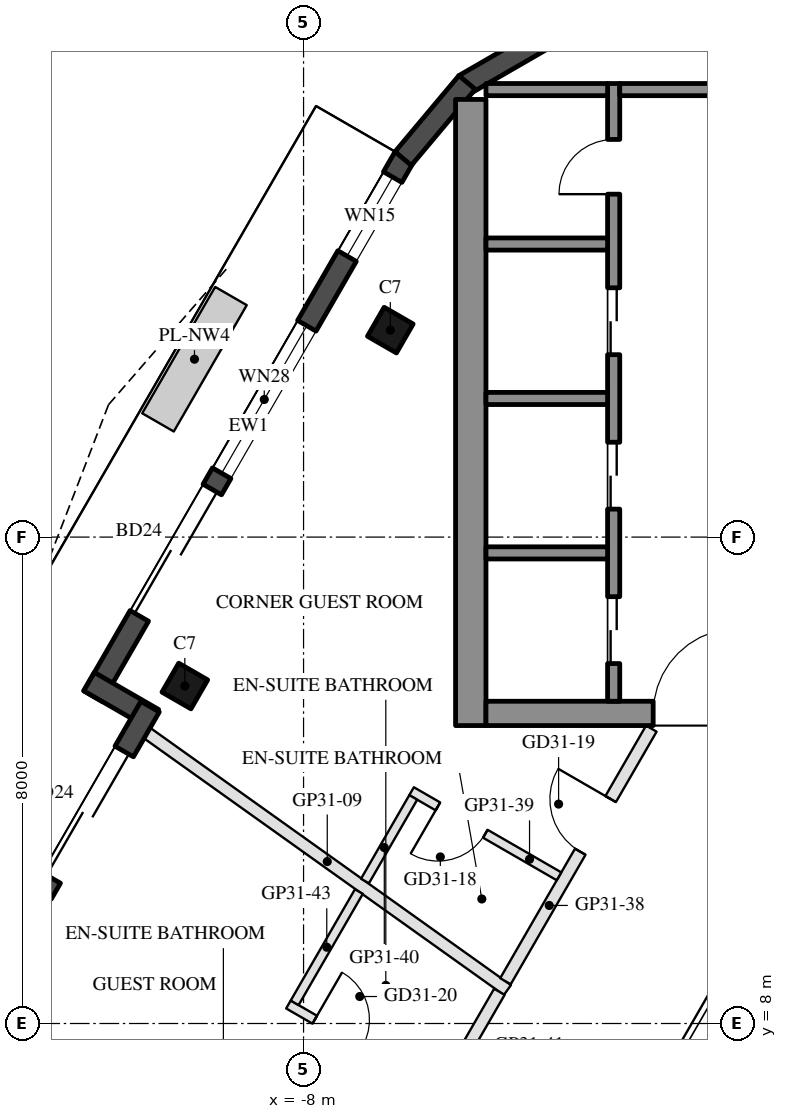
"""IFC4 building model, lengths in metres.
Left out: names, types, materials, properties, quantities, classifications, styles, units other than length and angle.
Written with IfcOpenShell. Run it as: python <this file> out.ifc"""

import sys

from ifc_helpers import new_model, si_unit, direction, frame, frame_2d, origin, origin_2d, place, context, subcontext, project, spatial, rectangle, hollow_rectangle, extrude, boolean, halfspace, element, fill, save


model = new_model("IFC4")
c1 = context("Model", 3, precision=1e-05, world=origin(), true_north=direction((0.0, 1.0)))
c2 = subcontext(c1, "Body", "Model", "MODEL_VIEW")
j1 = project(units=[si_unit("LENGTHUNIT", "METRE"), si_unit("PLANEANGLEUNIT", "RADIAN")], contexts=[c1])
p1 = place(None, origin())
s1 = spatial("IfcSite", under=j1, at=p1, CompositionType="ELEMENT")
p2 = place(p1, origin())
s2 = spatial("IfcBuilding", under=s1, at=p2, CompositionType="ELEMENT")
p3 = place(p2, frame((0.0, 0.0, 305.9)))
s3 = spatial("IfcBuildingStorey", under=s2, at=p3, CompositionType="ELEMENT", Elevation=305.9)
p4 = place(p3, frame((-6.573, 19.404, 0.0), z_axis=(0.0, 0.0, 1.0), x_axis=(0.5, 0.866025403784, 0.0)))
e1 = element("IfcColumn", 1, at=p4, inside=s3, PredefinedType="COLUMN", context=c2, shape_type="SweptSolid", body=[
    boolean("DIFFERENCE", extrude(hollow_rectangle(XDim=0.55, YDim=0.55, WallThickness=0.025, at=origin_2d()), origin(), (0.0, 0.0, 1.0), 3.7), halfspace(frame((0.0, 0.0, 3.66), z_axis=(0.0, 0.0, 1.0), x_axis=(1.0, 0.0, 0.0)), False)),
])
p5 = place(p3, frame((-9.953, 13.551, 0.0), z_axis=(0.0, 0.0, 1.0), x_axis=(0.5, 0.866025403784, 0.0)))
e2 = element("IfcColumn", 2, at=p5, inside=s3, PredefinedType="COLUMN", context=c2, shape_type="SweptSolid", body=[
    boolean("DIFFERENCE", extrude(hollow_rectangle(XDim=0.55, YDim=0.55, WallThickness=0.025, at=origin_2d()), origin(), (0.0, 0.0, 1.0), 3.7), halfspace(frame((0.0, 0.0, 3.666), z_axis=(0.0, 0.0, 1.0), x_axis=(1.0, 0.0, 0.0)), False)),
])
p6 = place(p3, frame((-6.344, 22.251, 0.0), z_axis=(0.0, 0.0, 1.0), x_axis=(-0.499983205548, -0.866035099848, 0.0)))
e3 = element("IfcWall", 3, at=p6, inside=s3, PredefinedType="SOLIDWALL", context=c2, shape_type="SweptSolid", body=[
    extrude(rectangle(XDim=10.239, YDim=0.35, at=frame_2d((5.12, 0.0))), origin(), (0.0, 0.0, 1.0), 3.55),
])
p7 = place(p6, frame((0.381, 0.0, 0.3)))
e4 = element("IfcOpeningElement", 4, at=p7, cuts=e3, PredefinedType="OPENING", context=c2, shape_type="SweptSolid", body=[
    extrude(rectangle(XDim=1.5, YDim=2.65, at=frame_2d((0.75, 1.325))), frame((0.0, 0.185, 0.0), z_axis=(0.0, -1.0, 0.0), x_axis=(1.0, 0.0, 0.0)), (0.0, 0.0, 1.0), 0.37),
])
p8 = place(p6, frame((6.314, 0.0, 0.0)))
e5 = element("IfcOpeningElement", 5, at=p8, cuts=e3, PredefinedType="OPENING", context=c2, shape_type="SweptSolid", body=[
    extrude(rectangle(XDim=2.4, YDim=2.4, at=frame_2d((1.2, 1.2))), frame((0.0, 0.185, 0.0), z_axis=(0.0, -1.0, 0.0), x_axis=(1.0, 0.0, 0.0)), (0.0, 0.0, 1.0), 0.37),
])
p9 = place(p6, frame((3.205, 0.0, 0.3)))
e6 = element("IfcOpeningElement", 6, at=p9, cuts=e3, PredefinedType="OPENING", context=c2, shape_type="SweptSolid", body=[
    extrude(rectangle(XDim=2.8, YDim=2.65, at=frame_2d((1.4, 1.325))), frame((0.0, 0.185, 0.0), z_axis=(0.0, -1.0, 0.0), x_axis=(1.0, 0.0, 0.0)), (0.0, 0.0, 1.0), 0.37),
])
p10 = place(p3, frame((-11.528, 13.623, 0.0), z_axis=(0.0, 0.0, 1.0), x_axis=(0.866005645448, -0.500034220881, 0.0)))
e7 = element("IfcWall", 7, at=p10, inside=s3, PredefinedType="SOLIDWALL", context=c2, shape_type="SweptSolid", body=[
    extrude(rectangle(XDim=1.22, YDim=0.35, at=frame_2d((0.61, 0.0))), origin(), (0.0, 0.0, 1.0), 3.55),
])
p11 = place(p3, frame((-10.524, 13.211, 0.0), z_axis=(0.0, 0.0, 1.0), x_axis=(-0.500008054862, -0.866020753258, 0.0)))
e8 = element("IfcWall", 8, at=p11, inside=s3, PredefinedType="SOLIDWALL", context=c2, shape_type="SweptSolid", body=[
    extrude(rectangle(XDim=5.599, YDim=0.35, at=frame_2d((2.8, 0.0))), origin(), (0.0, 0.0, 1.0), 3.55),
])
p12 = place(p11, frame((0.851, 0.0, 0.0)))
e9 = element("IfcOpeningElement", 9, at=p12, cuts=e8, PredefinedType="OPENING", context=c2, shape_type="SweptSolid", body=[
    extrude(rectangle(XDim=2.4, YDim=2.4, at=frame_2d((1.2, 1.2))), frame((0.0, 0.185, 0.0), z_axis=(0.0, -1.0, 0.0), x_axis=(1.0, 0.0, 0.0)), (0.0, 0.0, 1.0), 0.37),
])
p13 = place(p11, frame((3.551, 0.0, 0.3)))
e10 = element("IfcOpeningElement", 10, at=p13, cuts=e8, PredefinedType="OPENING", context=c2, shape_type="SweptSolid", body=[
    extrude(rectangle(XDim=1.7, YDim=2.65, at=frame_2d((0.85, 1.325))), frame((0.0, 0.185, 0.0), z_axis=(0.0, -1.0, 0.0), x_axis=(1.0, 0.0, 0.0)), (0.0, 0.0, 1.0), 0.37),
])
p14 = place(p3, frame((-3.942, 24.256, 0.0), z_axis=(0.0, 0.0, 1.0), x_axis=(-0.866018903231, -0.500011259119, 0.0)))
e11 = element("IfcWall", 11, at=p14, inside=s3, PredefinedType="SOLIDWALL", context=c2, shape_type="SweptSolid", body=[
    extrude(rectangle(XDim=1.634, YDim=0.35, at=frame_2d((0.817, 0.0))), origin(), (0.0, 0.0, 1.0), 3.55),
])
p15 = place(p3, frame((-5.311, 23.478, 0.0), z_axis=(0.0, 0.0, 1.0), x_axis=(-0.642782014883, -0.766049137682, 0.0)))
e12 = element("IfcWall", 12, at=p15, inside=s3, PredefinedType="SOLIDWALL", context=c2, shape_type="SweptSolid", body=[
    extrude(rectangle(XDim=1.634, YDim=0.35, at=frame_2d((0.817, 0.0))), origin(), (0.0, 0.0, 1.0), 3.55),
])
p16 = place(p3, frame((-5.25, 12.9, 0.0), z_axis=(0.0, 0.0, 1.0), x_axis=(0.0, 1.0, 0.0)))
e13 = element("IfcWall", 13, at=p16, inside=s3, PredefinedType="SHEAR", context=c2, shape_type="SweptSolid", body=[
    extrude(rectangle(XDim=10.299, YDim=0.5, at=frame_2d((5.149, 0.0))), origin(), (0.0, 0.0, 1.0), 3.5),
])
p17 = place(p3, frame((5.0, 13.1, 0.0), z_axis=(0.0, 0.0, 1.0), x_axis=(-1.0, 0.0, 0.0)))
e14 = element("IfcWall", 14, at=p17, inside=s3, PredefinedType="SHEAR", context=c2, shape_type="SweptSolid", body=[
    extrude(rectangle(XDim=10.0, YDim=0.4, at=frame_2d((5.0, 0.0))), origin(), (0.0, 0.0, 1.0), 3.5),
])
p18 = place(p17, frame((3.55, 0.0, 0.0)))
e15 = element("IfcOpeningElement", 15, at=p18, cuts=e14, PredefinedType="OPENING", context=c2, shape_type="SweptSolid", body=[
    extrude(rectangle(XDim=1.1, YDim=2.1, at=frame_2d((0.55, 1.05))), frame((0.0, 0.21, 0.0), z_axis=(0.0, -1.0, 0.0), x_axis=(1.0, 0.0, 0.0)), (0.0, 0.0, 1.0), 0.42),
])
p19 = place(p17, frame((5.85, 0.0, 0.0)))
e16 = element("IfcOpeningElement", 16, at=p19, cuts=e14, PredefinedType="OPENING", context=c2, shape_type="SweptSolid", body=[
    extrude(rectangle(XDim=1.4, YDim=2.1, at=frame_2d((0.7, 1.05))), frame((0.0, 0.21, 0.0), z_axis=(0.0, -1.0, 0.0), x_axis=(1.0, 0.0, 0.0)), (0.0, 0.0, 1.0), 0.42),
])
p20 = place(p3, frame((-2.9, 13.3, 0.0), z_axis=(0.0, 0.0, 1.0), x_axis=(0.0, 1.0, 0.0)))
e17 = element("IfcWall", 17, at=p20, inside=s3, PredefinedType="SHEAR", context=c2, shape_type="SweptSolid", body=[
    extrude(rectangle(XDim=10.16, YDim=0.2, at=frame_2d((5.08, 0.0))), origin(), (0.0, 0.0, 1.0), 3.5),
])
p21 = place(p20, frame((0.62, 0.0, 0.0)))
e18 = element("IfcOpeningElement", 18, at=p21, cuts=e17, PredefinedType="OPENING", context=c2, shape_type="SweptSolid", body=[
    extrude(rectangle(XDim=1.1, YDim=2.1, at=frame_2d((0.55, 1.05))), frame((0.0, 0.11, 0.0), z_axis=(0.0, -1.0, 0.0), x_axis=(1.0, 0.0, 0.0)), (0.0, 0.0, 1.0), 0.22),
])
p22 = place(p20, frame((3.16, 0.0, 0.0)))
e19 = element("IfcOpeningElement", 19, at=p22, cuts=e17, PredefinedType="OPENING", context=c2, shape_type="SweptSolid", body=[
    extrude(rectangle(XDim=1.1, YDim=2.1, at=frame_2d((0.55, 1.05))), frame((0.0, 0.11, 0.0), z_axis=(0.0, -1.0, 0.0), x_axis=(1.0, 0.0, 0.0)), (0.0, 0.0, 1.0), 0.22),
])
p23 = place(p20, frame((5.7, 0.0, 0.0)))
e20 = element("IfcOpeningElement", 20, at=p23, cuts=e17, PredefinedType="OPENING", context=c2, shape_type="SweptSolid", body=[
    extrude(rectangle(XDim=1.1, YDim=2.1, at=frame_2d((0.55, 1.05))), frame((0.0, 0.11, 0.0), z_axis=(0.0, -1.0, 0.0), x_axis=(1.0, 0.0, 0.0)), (0.0, 0.0, 1.0), 0.22),
])
p24 = place(p20, frame((8.34, 0.0, 0.0)))
e21 = element("IfcOpeningElement", 21, at=p24, cuts=e17, PredefinedType="OPENING", context=c2, shape_type="SweptSolid", body=[
    extrude(rectangle(XDim=0.9, YDim=2.1, at=frame_2d((0.45, 1.05))), frame((0.0, 0.11, 0.0), z_axis=(0.0, -1.0, 0.0), x_axis=(1.0, 0.0, 0.0)), (0.0, 0.0, 1.0), 0.22),
])
p25 = place(p3, frame((-1.0, 23.36, 0.0), z_axis=(0.0, 0.0, 1.0), x_axis=(-1.0, 0.0, 0.0)))
e22 = element("IfcWall", 22, at=p25, inside=s3, PredefinedType="SHEAR", context=c2, shape_type="SweptSolid", body=[
    extrude(rectangle(XDim=1.8, YDim=0.2, at=frame_2d((0.9, 0.0))), origin(), (0.0, 0.0, 1.0), 3.5),
])
for number, where, z_axis, x_axis in (
    (23, (-3.0, 15.74, 0.0), (0.0, 0.0, 1.0), (-1.0, 0.0, 0.0)),
    (24, (-3.0, 18.28, 0.0), (0.0, 0.0, 1.0), (-1.0, 0.0, 0.0)),
    (25, (-3.0, 20.82, 0.0), (0.0, 0.0, 1.0), (-1.0, 0.0, 0.0)),
    (26, (-3.0, 23.36, 0.0), (0.0, 0.0, 1.0), (-1.0, 0.0, 0.0)),
):
    element("IfcWall", number, at=place(p3, frame(where, z_axis=z_axis, x_axis=x_axis)), inside=s3, PredefinedType="SHEAR", context=c2, shape_type="SweptSolid", body=[
        extrude(rectangle(XDim=2.0, YDim=0.2, at=frame_2d((1.0, 0.0))), origin(), (0.0, 0.0, 1.0), 3.5),
    ])
p26 = place(p3, frame((-10.573, 12.776, 0.0), z_axis=(0.0, 0.0, 1.0), x_axis=(0.814114082564, -0.580704968613, 0.0)))
e27 = element("IfcWall", 27, at=p26, inside=s3, PredefinedType="PARTITIONING", context=c2, shape_type="SweptSolid", body=[
    extrude(rectangle(XDim=7.278, YDim=0.2, at=frame_2d((3.639, 0.0))), origin(), (0.0, 0.0, 1.0), 3.1),
])
p27 = place(p3, frame((-4.679, 8.695, 0.0), z_axis=(0.0, 0.0, 1.0), x_axis=(0.499986760557, 0.866033047446, 0.0)))
e28 = element("IfcWall", 28, at=p27, inside=s3, PredefinedType="PARTITIONING", context=c2, shape_type="SweptSolid", body=[
    extrude(rectangle(XDim=4.798, YDim=0.2, at=frame_2d((2.399, 0.0))), origin(), (0.0, 0.0, 1.0), 3.1),
])
p28 = place(p27, frame((2.46, 0.0, 0.0)))
e29 = element("IfcOpeningElement", 29, at=p28, cuts=e28, PredefinedType="OPENING", context=c2, shape_type="SweptSolid", body=[
    extrude(rectangle(XDim=1.0, YDim=2.1, at=frame_2d((0.5, 1.05))), frame((0.0, 0.11, 0.0), z_axis=(0.0, -1.0, 0.0), x_axis=(1.0, 0.0, 0.0)), (0.0, 0.0, 1.0), 0.22),
])
p29 = place(p3, frame((-3.799, 10.421, 0.0), z_axis=(0.0, 0.0, 1.0), x_axis=(-0.866034573852, 0.49998411664, 0.0)))
e30 = element("IfcWall", 30, at=p29, inside=s3, PredefinedType="PARTITIONING", context=c2, shape_type="SweptSolid", body=[
    extrude(rectangle(XDim=2.8, YDim=0.15, at=frame_2d((1.4, 0.0))), origin(), (0.0, 0.0, 1.0), 3.55),
])
p30 = place(p29, frame((1.4, 0.0, 0.0)))
e31 = element("IfcOpeningElement", 31, at=p30, cuts=e30, PredefinedType="OPENING", context=c2, shape_type="SweptSolid", body=[
    extrude(rectangle(XDim=0.9, YDim=2.1, at=frame_2d((0.45, 1.05))), frame((0.0, 0.085, 0.0), z_axis=(0.0, -1.0, 0.0), x_axis=(1.0, 0.0, 0.0)), (0.0, 0.0, 1.0), 0.17),
])
p31 = place(p3, frame((-6.196, 11.719, 0.0), z_axis=(0.0, 0.0, 1.0), x_axis=(-0.500041894521, -0.86600121462, 0.0)))
e32 = element("IfcWall", 32, at=p31, inside=s3, PredefinedType="PARTITIONING", context=c2, shape_type="SweptSolid", body=[
    extrude(rectangle(XDim=1.588, YDim=0.15, at=frame_2d((0.794, 0.0))), origin(), (0.0, 0.0, 1.0), 3.1),
])
p32 = place(p3, frame((-7.326, 4.111, 0.0), z_axis=(0.0, 0.0, 1.0), x_axis=(0.499970062876, 0.866042687301, 0.0)))
e33 = element("IfcWall", 33, at=p32, inside=s3, PredefinedType="PARTITIONING", context=c2, shape_type="SweptSolid", body=[
    extrude(rectangle(XDim=5.093, YDim=0.2, at=frame_2d((2.546, 0.0))), origin(), (0.0, 0.0, 1.0), 3.1),
])
p33 = place(p32, frame((1.652, 0.0, 0.0)))
e34 = element("IfcOpeningElement", 34, at=p33, cuts=e33, PredefinedType="OPENING", context=c2, shape_type="SweptSolid", body=[
    extrude(rectangle(XDim=1.0, YDim=2.1, at=frame_2d((0.5, 1.05))), frame((0.0, 0.11, 0.0), z_axis=(0.0, -1.0, 0.0), x_axis=(1.0, 0.0, 0.0)), (0.0, 0.0, 1.0), 0.22),
])
p34 = place(p3, frame((-8.249, 8.312, 0.0), z_axis=(0.0, 0.0, 1.0), x_axis=(0.866034573852, -0.49998411664, 0.0)))
e35 = element("IfcWall", 35, at=p34, inside=s3, PredefinedType="PARTITIONING", context=c2, shape_type="SweptSolid", body=[
    extrude(rectangle(XDim=2.8, YDim=0.15, at=frame_2d((1.4, 0.0))), origin(), (0.0, 0.0, 1.0), 3.55),
])
p35 = place(p34, frame((0.5, 0.0, 0.0)))
e36 = element("IfcOpeningElement", 36, at=p35, cuts=e35, PredefinedType="OPENING", context=c2, shape_type="SweptSolid", body=[
    extrude(rectangle(XDim=0.9, YDim=2.1, at=frame_2d((0.45, 1.05))), frame((0.0, 0.085, 0.0), z_axis=(0.0, -1.0, 0.0), x_axis=(1.0, 0.0, 0.0)), (0.0, 0.0, 1.0), 0.17),
])
p36 = place(p3, frame((-7.09, 10.169, 0.0), z_axis=(0.0, 0.0, 1.0), x_axis=(-0.500079259916, -0.865979638214, 0.0)))
e37 = element("IfcWall", 37, at=p36, inside=s3, PredefinedType="PARTITIONING", context=c2, shape_type="SweptSolid", body=[
    extrude(rectangle(XDim=2.113, YDim=0.15, at=frame_2d((1.056, 0.0))), origin(), (0.0, 0.0, 1.0), 3.1),
])
p37 = place(p7, origin())
e38 = element("IfcWindow", 38, at=p37, inside=s3, PartitioningType="SINGLE_PANEL", PredefinedType="WINDOW", context=c2, shape_type="SweptSolid", body=[
    extrude(rectangle(XDim=1.5, YDim=2.65, at=frame_2d((0.75, 1.325))), frame((0.0, 0.03, 0.0), z_axis=(0.0, -1.0, 0.0), x_axis=(1.0, 0.0, 0.0)), (0.0, 0.0, 1.0), 0.06),
])
fill(e4, e38)
p38 = place(p8, frame((2.4, 0.0, 0.0), z_axis=(0.0, 0.0, 1.0), x_axis=(-1.0, 0.0, 0.0)))
e39 = element("IfcDoor", 39, at=p38, inside=s3, OperationType="SLIDING_TO_LEFT", PredefinedType="DOOR", context=c2, shape_type="SweptSolid", body=[
    extrude(rectangle(XDim=2.4, YDim=2.4, at=frame_2d((1.2, 1.2))), frame((0.0, 0.025, 0.0), z_axis=(0.0, -1.0, 0.0), x_axis=(1.0, 0.0, 0.0)), (0.0, 0.0, 1.0), 0.05),
])
fill(e5, e39)
p39 = place(p9, origin())
e40 = element("IfcWindow", 40, at=p39, inside=s3, PartitioningType="SINGLE_PANEL", PredefinedType="WINDOW", context=c2, shape_type="SweptSolid", body=[
    extrude(rectangle(XDim=2.8, YDim=2.65, at=frame_2d((1.4, 1.325))), frame((0.0, 0.03, 0.0), z_axis=(0.0, -1.0, 0.0), x_axis=(1.0, 0.0, 0.0)), (0.0, 0.0, 1.0), 0.06),
])
fill(e6, e40)
p40 = place(p12, frame((2.4, 0.0, 0.0), z_axis=(0.0, 0.0, 1.0), x_axis=(-1.0, 0.0, 0.0)))
e41 = element("IfcDoor", 41, at=p40, inside=s3, OperationType="SLIDING_TO_LEFT", PredefinedType="DOOR", context=c2, shape_type="SweptSolid", body=[
    extrude(rectangle(XDim=2.4, YDim=2.4, at=frame_2d((1.2, 1.2))), frame((0.0, 0.025, 0.0), z_axis=(0.0, -1.0, 0.0), x_axis=(1.0, 0.0, 0.0)), (0.0, 0.0, 1.0), 0.05),
])
fill(e9, e41)
p41 = place(p21, origin())
e42 = element("IfcDoor", 42, at=p41, inside=s3, OperationType="DOUBLE_DOOR_SLIDING", PredefinedType="DOOR", context=c2, shape_type="SweptSolid", body=[
    extrude(rectangle(XDim=1.1, YDim=2.1, at=frame_2d((0.55, 1.05))), frame((0.0, 0.025, 0.0), z_axis=(0.0, -1.0, 0.0), x_axis=(1.0, 0.0, 0.0)), (0.0, 0.0, 1.0), 0.05),
])
fill(e18, e42)
p42 = place(p22, origin())
e43 = element("IfcDoor", 43, at=p42, inside=s3, OperationType="DOUBLE_DOOR_SLIDING", PredefinedType="DOOR", context=c2, shape_type="SweptSolid", body=[
    extrude(rectangle(XDim=1.1, YDim=2.1, at=frame_2d((0.55, 1.05))), frame((0.0, 0.025, 0.0), z_axis=(0.0, -1.0, 0.0), x_axis=(1.0, 0.0, 0.0)), (0.0, 0.0, 1.0), 0.05),
])
fill(e19, e43)
p43 = place(p23, origin())
e44 = element("IfcDoor", 44, at=p43, inside=s3, OperationType="DOUBLE_DOOR_SLIDING", PredefinedType="DOOR", context=c2, shape_type="SweptSolid", body=[
    extrude(rectangle(XDim=1.1, YDim=2.1, at=frame_2d((0.55, 1.05))), frame((0.0, 0.025, 0.0), z_axis=(0.0, -1.0, 0.0), x_axis=(1.0, 0.0, 0.0)), (0.0, 0.0, 1.0), 0.05),
])
fill(e20, e44)
p44 = place(p24, origin())
e45 = element("IfcDoor", 45, at=p44, inside=s3, OperationType="SINGLE_SWING_LEFT", PredefinedType="DOOR", context=c2, shape_type="SweptSolid", body=[
    extrude(rectangle(XDim=0.9, YDim=2.1, at=frame_2d((0.45, 1.05))), frame((0.0, 0.025, 0.0), z_axis=(0.0, -1.0, 0.0), x_axis=(1.0, 0.0, 0.0)), (0.0, 0.0, 1.0), 0.05),
])
fill(e21, e45)
p45 = place(p19, frame((1.4, 0.0, 0.0), z_axis=(0.0, 0.0, 1.0), x_axis=(-1.0, 0.0, 0.0)))
e46 = element("IfcDoor", 46, at=p45, inside=s3, OperationType="DOUBLE_DOOR_SINGLE_SWING", PredefinedType="DOOR", context=c2, shape_type="SweptSolid", body=[
    extrude(rectangle(XDim=1.4, YDim=2.1, at=frame_2d((0.7, 1.05))), frame((0.0, 0.025, 0.0), z_axis=(0.0, -1.0, 0.0), x_axis=(1.0, 0.0, 0.0)), (0.0, 0.0, 1.0), 0.05),
])
fill(e16, e46)
p46 = place(p30, origin())
e47 = element("IfcDoor", 47, at=p46, inside=s3, OperationType="SINGLE_SWING_RIGHT", PredefinedType="DOOR", context=c2, shape_type="SweptSolid", body=[
    extrude(rectangle(XDim=0.9, YDim=2.1, at=frame_2d((0.45, 1.05))), frame((0.0, 0.025, 0.0), z_axis=(0.0, -1.0, 0.0), x_axis=(1.0, 0.0, 0.0)), (0.0, 0.0, 1.0), 0.05),
])
fill(e31, e47)
p47 = place(p28, origin())
e48 = element("IfcDoor", 48, at=p47, inside=s3, OperationType="SINGLE_SWING_RIGHT", PredefinedType="DOOR", context=c2, shape_type="SweptSolid", body=[
    extrude(rectangle(XDim=1.0, YDim=2.1, at=frame_2d((0.5, 1.05))), frame((0.0, 0.025, 0.0), z_axis=(0.0, -1.0, 0.0), x_axis=(1.0, 0.0, 0.0)), (0.0, 0.0, 1.0), 0.05),
])
fill(e29, e48)
p48 = place(p35, origin())
e49 = element("IfcDoor", 49, at=p48, inside=s3, OperationType="SINGLE_SWING_LEFT", PredefinedType="DOOR", context=c2, shape_type="SweptSolid", body=[
    extrude(rectangle(XDim=0.9, YDim=2.1, at=frame_2d((0.45, 1.05))), frame((0.0, 0.025, 0.0), z_axis=(0.0, -1.0, 0.0), x_axis=(1.0, 0.0, 0.0)), (0.0, 0.0, 1.0), 0.05),
])
fill(e36, e49)
save(model, sys.argv[1])
